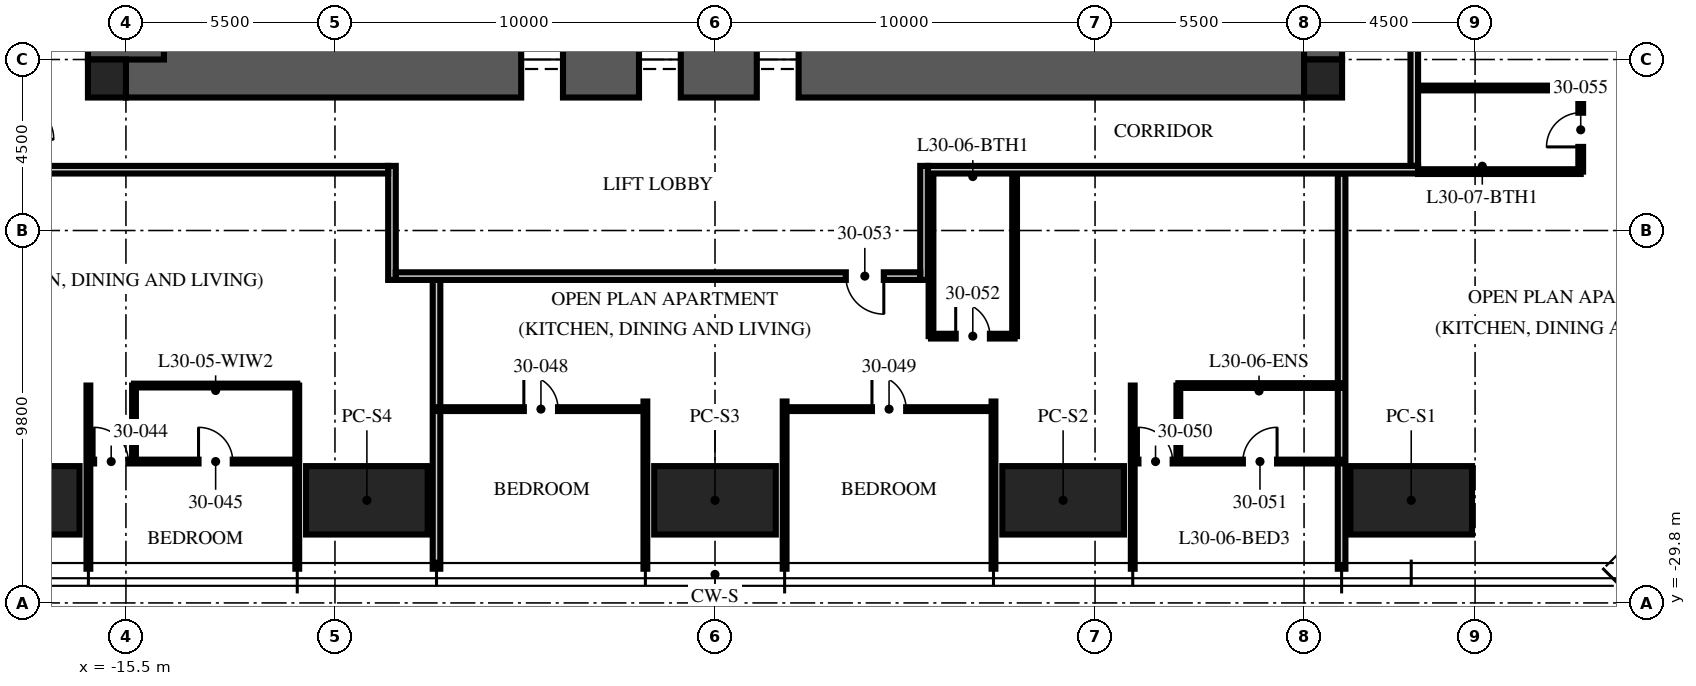
"""IFC4 building model, lengths in metres.
Left out: names, types, materials, properties, quantities, classifications, styles, units other than length and angle.
Written with IfcOpenShell. Run it as: python <this file> out.ifc"""

import sys

from ifc_helpers import new_model, si_unit, direction, frame, frame_2d, origin, origin_2d, place, context, subcontext, project, spatial, rectangle, extrude, element, fill, save


model = new_model("IFC4")
c1 = context("Model", 3, precision=1e-05, world=origin(), true_north=direction((0.0, 1.0)))
c2 = subcontext(c1, "Body", "Model", "MODEL_VIEW")
j1 = project(units=[si_unit("LENGTHUNIT", "METRE"), si_unit("PLANEANGLEUNIT", "RADIAN")], contexts=[c1])
p1 = place(None, origin())
s1 = spatial("IfcSite", under=j1, at=p1, CompositionType="ELEMENT")
p2 = place(p1, origin())
s2 = spatial("IfcBuilding", under=s1, at=p2, CompositionType="ELEMENT")
p3 = place(p2, frame((0.0, 0.0, 122.25)))
s3 = spatial("IfcBuildingStorey", under=s2, at=p3, CompositionType="ELEMENT", Elevation=122.25)
p4 = place(p3, frame((15.5, -15.5, -0.25), z_axis=(0.0, 0.0, 1.0), x_axis=(0.0, 1.0, 0.0)))
e1 = element("IfcWall", 1, at=p4, inside=s3, PredefinedType="SHEAR", context=c2, shape_type="SweptSolid", body=[
    extrude(rectangle(XDim=31.0, YDim=2.0, at=frame_2d((15.5, 0.0))), origin(), (0.0, 0.0, 1.0), 3.75),
])
p5 = place(p4, frame((6.5, 0.0, 0.25)))
e2 = element("IfcOpeningElement", 2, at=p5, cuts=e1, PredefinedType="OPENING", context=c2, shape_type="SweptSolid", body=[
    extrude(rectangle(XDim=1.2, YDim=2.1, at=frame_2d((0.6, 1.05))), frame((0.0, 1.01, 0.0), z_axis=(0.0, -1.0, 0.0), x_axis=(1.0, 0.0, 0.0)), (0.0, 0.0, 1.0), 2.02),
])
p6 = place(p4, frame((23.0, 0.0, 0.25)))
e3 = element("IfcOpeningElement", 3, at=p6, cuts=e1, PredefinedType="OPENING", context=c2, shape_type="SweptSolid", body=[
    extrude(rectangle(XDim=1.8, YDim=2.1, at=frame_2d((0.9, 1.05))), frame((0.0, 1.01, 0.0), z_axis=(0.0, -1.0, 0.0), x_axis=(1.0, 0.0, 0.0)), (0.0, 0.0, 1.0), 2.02),
])
p7 = place(p3, frame((-15.5, -15.5, -0.25), z_axis=(0.0, 0.0, 1.0), x_axis=(1.0, 0.0, 0.0)))
e4 = element("IfcWall", 4, at=p7, inside=s3, PredefinedType="SHEAR", context=c2, shape_type="SweptSolid", body=[
    extrude(rectangle(XDim=31.0, YDim=2.0, at=frame_2d((15.5, 0.0))), origin(), (0.0, 0.0, 1.0), 3.75),
])
p8 = place(p7, frame((10.4, 0.0, 0.25)))
e5 = element("IfcOpeningElement", 5, at=p8, cuts=e4, PredefinedType="OPENING", context=c2, shape_type="SweptSolid", body=[
    extrude(rectangle(XDim=1.1, YDim=2.1, at=frame_2d((0.55, 1.05))), frame((0.0, 1.01, 0.0), z_axis=(0.0, -1.0, 0.0), x_axis=(1.0, 0.0, 0.0)), (0.0, 0.0, 1.0), 2.02),
])
p9 = place(p7, frame((13.5, 0.0, 0.25)))
e6 = element("IfcOpeningElement", 6, at=p9, cuts=e4, PredefinedType="OPENING", context=c2, shape_type="SweptSolid", body=[
    extrude(rectangle(XDim=1.1, YDim=2.1, at=frame_2d((0.55, 1.05))), frame((0.0, 1.01, 0.0), z_axis=(0.0, -1.0, 0.0), x_axis=(1.0, 0.0, 0.0)), (0.0, 0.0, 1.0), 2.02),
])
p10 = place(p7, frame((16.6, 0.0, 0.25)))
e7 = element("IfcOpeningElement", 7, at=p10, cuts=e4, PredefinedType="OPENING", context=c2, shape_type="SweptSolid", body=[
    extrude(rectangle(XDim=1.1, YDim=2.1, at=frame_2d((0.55, 1.05))), frame((0.0, 1.01, 0.0), z_axis=(0.0, -1.0, 0.0), x_axis=(1.0, 0.0, 0.0)), (0.0, 0.0, 1.0), 2.02),
])
p11 = place(p3, frame((-15.5, -15.5, -0.25), z_axis=(0.0, 0.0, 1.0), x_axis=(0.0, 1.0, 0.0)))
e8 = element("IfcWall", 8, at=p11, inside=s3, PredefinedType="SHEAR", context=c2, shape_type="SweptSolid", body=[
    extrude(rectangle(XDim=31.0, YDim=2.0, at=frame_2d((15.5, 0.0))), origin(), (0.0, 0.0, 1.0), 3.75),
])
p12 = place(p11, frame((6.5, 0.0, 0.25)))
e9 = element("IfcOpeningElement", 9, at=p12, cuts=e8, PredefinedType="OPENING", context=c2, shape_type="SweptSolid", body=[
    extrude(rectangle(XDim=1.2, YDim=2.1, at=frame_2d((0.6, 1.05))), frame((0.0, 1.01, 0.0), z_axis=(0.0, -1.0, 0.0), x_axis=(1.0, 0.0, 0.0)), (0.0, 0.0, 1.0), 2.02),
])
p13 = place(p11, frame((23.0, 0.0, 0.25)))
e10 = element("IfcOpeningElement", 10, at=p13, cuts=e8, PredefinedType="OPENING", context=c2, shape_type="SweptSolid", body=[
    extrude(rectangle(XDim=1.8, YDim=2.1, at=frame_2d((0.9, 1.05))), frame((0.0, 1.01, 0.0), z_axis=(0.0, -1.0, 0.0), x_axis=(1.0, 0.0, 0.0)), (0.0, 0.0, 1.0), 2.02),
])
for number, where, z_axis, x_axis in (
    (11, (-16.0, -16.0, -0.25), (0.0, 0.0, 1.0), (1.0, 0.0, 0.0)),
    (12, (16.0, -16.0, -0.25), (0.0, 0.0, 1.0), (1.0, 0.0, 0.0)),
):
    element("IfcColumn", number, at=place(p3, frame(where, z_axis=z_axis, x_axis=x_axis)), inside=s3, PredefinedType="COLUMN", context=c2, shape_type="SweptSolid", body=[
        extrude(rectangle(XDim=1.0, YDim=1.0, at=origin_2d()), origin(), (0.0, 0.0, 1.0), 3.75),
    ])
for number, where, z_axis, x_axis in (
    (13, (18.32, -27.1, 0.0), (0.0, 0.0, 1.0), (1.0, 0.0, 0.0)),
    (14, (9.16, -27.1, 0.0), (0.0, 0.0, 1.0), (1.0, 0.0, 0.0)),
    (15, (0.0, -27.1, 0.0), (0.0, 0.0, 1.0), (1.0, 0.0, 0.0)),
    (16, (-9.16, -27.1, 0.0), (0.0, 0.0, 1.0), (1.0, 0.0, 0.0)),
    (17, (-18.32, -27.1, 0.0), (0.0, 0.0, 1.0), (1.0, 0.0, 0.0)),
):
    element("IfcColumn", number, at=place(p3, frame(where, z_axis=z_axis, x_axis=x_axis)), inside=s3, PredefinedType="COLUMN", context=c2, shape_type="SweptSolid", body=[
        extrude(rectangle(XDim=3.2, YDim=1.8, at=origin_2d()), origin(), (0.0, 0.0, 1.0), 3.75),
    ])
for number, where, z_axis, x_axis in (
    (18, (-16.488, -24.08, 0.0), (0.0, 0.0, 1.0), (0.0, -1.0, 0.0)),
    (19, (-10.992, -24.08, 0.0), (0.0, 0.0, 1.0), (0.0, -1.0, 0.0)),
):
    element("IfcWall", number, at=place(p3, frame(where, z_axis=z_axis, x_axis=x_axis)), inside=s3, PredefinedType="PARTITIONING", context=c2, shape_type="SweptSolid", body=[
        extrude(rectangle(XDim=4.82, YDim=0.1, at=frame_2d((2.41, 0.0))), origin(), (0.0, 0.0, 1.0), 2.81),
    ])
p14 = place(p3, frame((-7.328, -21.3, 0.0), z_axis=(0.0, 0.0, 1.0), x_axis=(0.0, -1.0, 0.0)))
e20 = element("IfcWall", 20, at=p14, inside=s3, PredefinedType="PARTITIONING", context=c2, shape_type="SweptSolid", body=[
    extrude(rectangle(XDim=7.6, YDim=0.2, at=frame_2d((3.8, 0.0))), origin(), (0.0, 0.0, 1.0), 2.81),
])
for number, where, z_axis, x_axis in (
    (21, (-1.832, -24.5, 0.0), (0.0, 0.0, 1.0), (0.0, -1.0, 0.0)),
    (22, (1.832, -24.5, 0.0), (0.0, 0.0, 1.0), (0.0, -1.0, 0.0)),
    (23, (7.328, -24.5, 0.0), (0.0, 0.0, 1.0), (0.0, -1.0, 0.0)),
):
    element("IfcWall", number, at=place(p3, frame(where, z_axis=z_axis, x_axis=x_axis)), inside=s3, PredefinedType="PARTITIONING", context=c2, shape_type="SweptSolid", body=[
        extrude(rectangle(XDim=4.4, YDim=0.1, at=frame_2d((2.2, 0.0))), origin(), (0.0, 0.0, 1.0), 2.81),
    ])
p15 = place(p3, frame((10.992, -24.08, 0.0), z_axis=(0.0, 0.0, 1.0), x_axis=(0.0, -1.0, 0.0)))
e24 = element("IfcWall", 24, at=p15, inside=s3, PredefinedType="PARTITIONING", context=c2, shape_type="SweptSolid", body=[
    extrude(rectangle(XDim=4.82, YDim=0.1, at=frame_2d((2.41, 0.0))), origin(), (0.0, 0.0, 1.0), 2.81),
])
p16 = place(p3, frame((16.488, -18.5, 0.0), z_axis=(0.0, 0.0, 1.0), x_axis=(0.0, -1.0, 0.0)))
e25 = element("IfcWall", 25, at=p16, inside=s3, PredefinedType="PARTITIONING", context=c2, shape_type="SweptSolid", body=[
    extrude(rectangle(XDim=10.4, YDim=0.2, at=frame_2d((5.2, 0.0))), origin(), (0.0, 0.0, 1.0), 2.81),
])
p17 = place(p3, frame((-16.488, -26.08, 0.0), z_axis=(0.0, 0.0, 1.0), x_axis=(1.0, 0.0, 0.0)))
e26 = element("IfcWall", 26, at=p17, inside=s3, PredefinedType="PARTITIONING", context=c2, shape_type="SweptSolid", body=[
    extrude(rectangle(XDim=5.496, YDim=0.1, at=frame_2d((2.748, 0.0))), origin(), (0.0, 0.0, 1.0), 2.81),
])
p18 = place(p17, frame((0.15, 0.0, 0.0)))
e27 = element("IfcOpeningElement", 27, at=p18, cuts=e26, PredefinedType="OPENING", context=c2, shape_type="SweptSolid", body=[
    extrude(rectangle(XDim=0.9, YDim=2.1, at=frame_2d((0.45, 1.05))), frame((0.0, 0.06, 0.0), z_axis=(0.0, -1.0, 0.0), x_axis=(1.0, 0.0, 0.0)), (0.0, 0.0, 1.0), 0.12),
])
p19 = place(p17, frame((2.898, 0.0, 0.0)))
e28 = element("IfcOpeningElement", 28, at=p19, cuts=e26, PredefinedType="OPENING", context=c2, shape_type="SweptSolid", body=[
    extrude(rectangle(XDim=0.9, YDim=2.1, at=frame_2d((0.45, 1.05))), frame((0.0, 0.06, 0.0), z_axis=(0.0, -1.0, 0.0), x_axis=(1.0, 0.0, 0.0)), (0.0, 0.0, 1.0), 0.12),
])
p20 = place(p3, frame((-15.288, -24.08, 0.0), z_axis=(0.0, 0.0, 1.0), x_axis=(0.0, -1.0, 0.0)))
e29 = element("IfcWall", 29, at=p20, inside=s3, PredefinedType="PARTITIONING", context=c2, shape_type="SweptSolid", body=[
    extrude(rectangle(XDim=2.0, YDim=0.1, at=frame_2d((1.0, 0.0))), origin(), (0.0, 0.0, 1.0), 3.5),
])
p21 = place(p3, frame((-15.288, -24.08, 0.0), z_axis=(0.0, 0.0, 1.0), x_axis=(1.0, 0.0, 0.0)))
e30 = element("IfcWall", 30, at=p21, inside=s3, PredefinedType="PARTITIONING", context=c2, shape_type="SweptSolid", body=[
    extrude(rectangle(XDim=4.296, YDim=0.1, at=frame_2d((2.148, 0.0))), origin(), (0.0, 0.0, 1.0), 2.81),
])
p22 = place(p3, frame((-7.328, -24.7, 0.0), z_axis=(0.0, 0.0, 1.0), x_axis=(1.0, 0.0, 0.0)))
e31 = element("IfcWall", 31, at=p22, inside=s3, PredefinedType="PARTITIONING", context=c2, shape_type="SweptSolid", body=[
    extrude(rectangle(XDim=5.496, YDim=0.1, at=frame_2d((2.748, 0.0))), origin(), (0.0, 0.0, 1.0), 2.81),
])
p23 = place(p22, frame((2.298, 0.0, 0.0)))
e32 = element("IfcOpeningElement", 32, at=p23, cuts=e31, PredefinedType="OPENING", context=c2, shape_type="SweptSolid", body=[
    extrude(rectangle(XDim=0.9, YDim=2.1, at=frame_2d((0.45, 1.05))), frame((0.0, 0.06, 0.0), z_axis=(0.0, -1.0, 0.0), x_axis=(1.0, 0.0, 0.0)), (0.0, 0.0, 1.0), 0.12),
])
p24 = place(p3, frame((1.832, -24.7, 0.0), z_axis=(0.0, 0.0, 1.0), x_axis=(1.0, 0.0, 0.0)))
e33 = element("IfcWall", 33, at=p24, inside=s3, PredefinedType="PARTITIONING", context=c2, shape_type="SweptSolid", body=[
    extrude(rectangle(XDim=5.496, YDim=0.1, at=frame_2d((2.748, 0.0))), origin(), (0.0, 0.0, 1.0), 2.81),
])
p25 = place(p24, frame((2.298, 0.0, 0.0)))
e34 = element("IfcOpeningElement", 34, at=p25, cuts=e33, PredefinedType="OPENING", context=c2, shape_type="SweptSolid", body=[
    extrude(rectangle(XDim=0.9, YDim=2.1, at=frame_2d((0.45, 1.05))), frame((0.0, 0.06, 0.0), z_axis=(0.0, -1.0, 0.0), x_axis=(1.0, 0.0, 0.0)), (0.0, 0.0, 1.0), 0.12),
])
p26 = place(p3, frame((10.992, -26.08, 0.0), z_axis=(0.0, 0.0, 1.0), x_axis=(1.0, 0.0, 0.0)))
e35 = element("IfcWall", 35, at=p26, inside=s3, PredefinedType="PARTITIONING", context=c2, shape_type="SweptSolid", body=[
    extrude(rectangle(XDim=5.496, YDim=0.1, at=frame_2d((2.748, 0.0))), origin(), (0.0, 0.0, 1.0), 2.81),
])
p27 = place(p26, frame((0.15, 0.0, 0.0)))
e36 = element("IfcOpeningElement", 36, at=p27, cuts=e35, PredefinedType="OPENING", context=c2, shape_type="SweptSolid", body=[
    extrude(rectangle(XDim=0.9, YDim=2.1, at=frame_2d((0.45, 1.05))), frame((0.0, 0.06, 0.0), z_axis=(0.0, -1.0, 0.0), x_axis=(1.0, 0.0, 0.0)), (0.0, 0.0, 1.0), 0.12),
])
p28 = place(p26, frame((2.898, 0.0, 0.0)))
e37 = element("IfcOpeningElement", 37, at=p28, cuts=e35, PredefinedType="OPENING", context=c2, shape_type="SweptSolid", body=[
    extrude(rectangle(XDim=0.9, YDim=2.1, at=frame_2d((0.45, 1.05))), frame((0.0, 0.06, 0.0), z_axis=(0.0, -1.0, 0.0), x_axis=(1.0, 0.0, 0.0)), (0.0, 0.0, 1.0), 0.12),
])
p29 = place(p3, frame((12.192, -24.08, 0.0), z_axis=(0.0, 0.0, 1.0), x_axis=(0.0, -1.0, 0.0)))
e38 = element("IfcWall", 38, at=p29, inside=s3, PredefinedType="PARTITIONING", context=c2, shape_type="SweptSolid", body=[
    extrude(rectangle(XDim=2.0, YDim=0.1, at=frame_2d((1.0, 0.0))), origin(), (0.0, 0.0, 1.0), 3.5),
])
p30 = place(p3, frame((12.192, -24.08, 0.0), z_axis=(0.0, 0.0, 1.0), x_axis=(1.0, 0.0, 0.0)))
e39 = element("IfcWall", 39, at=p30, inside=s3, PredefinedType="PARTITIONING", context=c2, shape_type="SweptSolid", body=[
    extrude(rectangle(XDim=4.296, YDim=0.125, at=frame_2d((2.148, 0.0))), origin(), (0.0, 0.0, 1.0), 2.81),
])
p31 = place(p3, frame((5.684, -22.78, 0.0), z_axis=(0.0, 0.0, 1.0), x_axis=(1.0, 0.0, 0.0)))
e40 = element("IfcWall", 40, at=p31, inside=s3, PredefinedType="PARTITIONING", context=c2, shape_type="SweptSolid", body=[
    extrude(rectangle(XDim=2.2, YDim=0.125, at=frame_2d((1.1, 0.0))), origin(), (0.0, 0.0, 1.0), 3.5),
])
p32 = place(p31, frame((0.65, 0.0, 0.0)))
e41 = element("IfcOpeningElement", 41, at=p32, cuts=e40, PredefinedType="OPENING", context=c2, shape_type="SweptSolid", body=[
    extrude(rectangle(XDim=0.9, YDim=2.1, at=frame_2d((0.45, 1.05))), frame((0.0, 0.073, 0.0), z_axis=(0.0, -1.0, 0.0), x_axis=(1.0, 0.0, 0.0)), (0.0, 0.0, 1.0), 0.145),
])
for number, where, z_axis, x_axis in (
    (42, (5.684, -18.5, 0.0), (0.0, 0.0, 1.0), (0.0, -1.0, 0.0)),
    (43, (7.884, -18.5, 0.0), (0.0, 0.0, 1.0), (0.0, -1.0, 0.0)),
):
    element("IfcWall", number, at=place(p3, frame(where, z_axis=z_axis, x_axis=x_axis)), inside=s3, PredefinedType="PARTITIONING", context=c2, shape_type="SweptSolid", body=[
        extrude(rectangle(XDim=4.28, YDim=0.125, at=frame_2d((2.14, 0.0))), origin(), (0.0, 0.0, 1.0), 3.5),
    ])
p33 = place(p3, frame((22.78, -18.45, 0.0), z_axis=(0.0, 0.0, 1.0), x_axis=(0.0, 1.0, 0.0)))
e44 = element("IfcWall", 44, at=p33, inside=s3, PredefinedType="PARTITIONING", context=c2, shape_type="SweptSolid", body=[
    extrude(rectangle(XDim=2.2, YDim=0.125, at=frame_2d((1.1, 0.0))), origin(), (0.0, 0.0, 1.0), 2.7),
])
p34 = place(p33, frame((0.65, 0.0, 0.0)))
e45 = element("IfcOpeningElement", 45, at=p34, cuts=e44, PredefinedType="OPENING", context=c2, shape_type="SweptSolid", body=[
    extrude(rectangle(XDim=0.9, YDim=2.1, at=frame_2d((0.45, 1.05))), frame((0.0, 0.073, 0.0), z_axis=(0.0, -1.0, 0.0), x_axis=(1.0, 0.0, 0.0)), (0.0, 0.0, 1.0), 0.145),
])
p35 = place(p3, frame((18.5, -18.45, 0.0), z_axis=(0.0, 0.0, 1.0), x_axis=(1.0, 0.0, 0.0)))
e46 = element("IfcWall", 46, at=p35, inside=s3, PredefinedType="PARTITIONING", context=c2, shape_type="SweptSolid", body=[
    extrude(rectangle(XDim=4.28, YDim=0.125, at=frame_2d((2.14, 0.0))), origin(), (0.0, 0.0, 1.0), 2.3),
])
p36 = place(p3, frame((18.5, -16.25, 0.0), z_axis=(0.0, 0.0, 1.0), x_axis=(1.0, 0.0, 0.0)))
e47 = element("IfcWall", 47, at=p36, inside=s3, PredefinedType="PARTITIONING", context=c2, shape_type="SweptSolid", body=[
    extrude(rectangle(XDim=4.28, YDim=0.125, at=frame_2d((2.14, 0.0))), origin(), (0.0, 0.0, 1.0), 3.5),
])
p37 = place(p3, frame((18.4, -18.3, 0.0), z_axis=(0.0, 0.0, 1.0), x_axis=(0.0, 1.0, 0.0)))
e48 = element("IfcWall", 48, at=p37, inside=s3, PredefinedType="PARTITIONING", context=c2, shape_type="SweptSolid", body=[
    extrude(rectangle(XDim=8.972, YDim=0.2, at=frame_2d((4.486, 0.0))), origin(), (0.0, 0.0, 1.0), 2.3),
])
p38 = place(p3, frame((18.5, -18.4, 0.0), z_axis=(0.0, 0.0, 1.0), x_axis=(-1.0, 0.0, 0.0)))
e49 = element("IfcWall", 49, at=p38, inside=s3, PredefinedType="PARTITIONING", context=c2, shape_type="SweptSolid", body=[
    extrude(rectangle(XDim=12.9, YDim=0.2, at=frame_2d((6.45, 0.0))), origin(), (0.0, 0.0, 1.0), 2.3),
])
for number, where, z_axis, x_axis in (
    (50, (5.5, -18.3, 0.0), (0.0, 0.0, 1.0), (0.0, -1.0, 0.0)),
    (51, (-8.5, -18.3, 0.0), (0.0, 0.0, 1.0), (0.0, -1.0, 0.0)),
):
    element("IfcWall", number, at=place(p3, frame(where, z_axis=z_axis, x_axis=x_axis)), inside=s3, PredefinedType="PARTITIONING", context=c2, shape_type="SweptSolid", body=[
        extrude(rectangle(XDim=3.0, YDim=0.2, at=frame_2d((1.5, 0.0))), origin(), (0.0, 0.0, 1.0), 3.5),
    ])
p39 = place(p3, frame((5.4, -21.2, 0.0), z_axis=(0.0, 0.0, 1.0), x_axis=(-1.0, 0.0, 0.0)))
e52 = element("IfcWall", 52, at=p39, inside=s3, PredefinedType="PARTITIONING", context=c2, shape_type="SweptSolid", body=[
    extrude(rectangle(XDim=13.8, YDim=0.2, at=frame_2d((6.9, 0.0))), origin(), (0.0, 0.0, 1.0), 2.7),
])
p40 = place(p39, frame((0.958, 0.0, 0.0)))
e53 = element("IfcOpeningElement", 53, at=p40, cuts=e52, PredefinedType="OPENING", context=c2, shape_type="SweptSolid", body=[
    extrude(rectangle(XDim=1.0, YDim=2.2, at=frame_2d((0.5, 1.1))), frame((0.0, 0.11, 0.0), z_axis=(0.0, -1.0, 0.0), x_axis=(1.0, 0.0, 0.0)), (0.0, 0.0, 1.0), 0.22),
])
p41 = place(p3, frame((-8.6, -18.4, 0.0), z_axis=(0.0, 0.0, 1.0), x_axis=(-1.0, 0.0, 0.0)))
e54 = element("IfcWall", 54, at=p41, inside=s3, PredefinedType="PARTITIONING", context=c2, shape_type="SweptSolid", body=[
    extrude(rectangle(XDim=9.9, YDim=0.2, at=frame_2d((4.95, 0.0))), origin(), (0.0, 0.0, 1.0), 2.3),
])
p42 = place(p8, origin())
e55 = element("IfcDoor", 55, at=p42, inside=s3, OperationType="DOUBLE_DOOR_SLIDING", PredefinedType="DOOR", context=c2, shape_type="SweptSolid", body=[
    extrude(rectangle(XDim=1.1, YDim=2.1, at=frame_2d((0.55, 1.05))), frame((0.0, 0.025, 0.0), z_axis=(0.0, -1.0, 0.0), x_axis=(1.0, 0.0, 0.0)), (0.0, 0.0, 1.0), 0.05),
])
fill(e5, e55)
p43 = place(p9, origin())
e56 = element("IfcDoor", 56, at=p43, inside=s3, OperationType="DOUBLE_DOOR_SLIDING", PredefinedType="DOOR", context=c2, shape_type="SweptSolid", body=[
    extrude(rectangle(XDim=1.1, YDim=2.1, at=frame_2d((0.55, 1.05))), frame((0.0, 0.025, 0.0), z_axis=(0.0, -1.0, 0.0), x_axis=(1.0, 0.0, 0.0)), (0.0, 0.0, 1.0), 0.05),
])
fill(e6, e56)
p44 = place(p10, origin())
e57 = element("IfcDoor", 57, at=p44, inside=s3, OperationType="DOUBLE_DOOR_SLIDING", PredefinedType="DOOR", context=c2, shape_type="SweptSolid", body=[
    extrude(rectangle(XDim=1.1, YDim=2.1, at=frame_2d((0.55, 1.05))), frame((0.0, 0.025, 0.0), z_axis=(0.0, -1.0, 0.0), x_axis=(1.0, 0.0, 0.0)), (0.0, 0.0, 1.0), 0.05),
])
fill(e7, e57)
p45 = place(p18, origin())
e58 = element("IfcDoor", 58, at=p45, inside=s3, OperationType="SINGLE_SWING_LEFT", PredefinedType="DOOR", context=c2, shape_type="SweptSolid", body=[
    extrude(rectangle(XDim=0.9, YDim=2.1, at=frame_2d((0.45, 1.05))), frame((0.0, 0.025, 0.0), z_axis=(0.0, -1.0, 0.0), x_axis=(1.0, 0.0, 0.0)), (0.0, 0.0, 1.0), 0.05),
])
fill(e27, e58)
p46 = place(p19, origin())
e59 = element("IfcDoor", 59, at=p46, inside=s3, OperationType="SINGLE_SWING_LEFT", PredefinedType="DOOR", context=c2, shape_type="SweptSolid", body=[
    extrude(rectangle(XDim=0.9, YDim=2.1, at=frame_2d((0.45, 1.05))), frame((0.0, 0.025, 0.0), z_axis=(0.0, -1.0, 0.0), x_axis=(1.0, 0.0, 0.0)), (0.0, 0.0, 1.0), 0.05),
])
fill(e28, e59)
p47 = place(p23, origin())
e60 = element("IfcDoor", 60, at=p47, inside=s3, OperationType="SINGLE_SWING_LEFT", PredefinedType="DOOR", context=c2, shape_type="SweptSolid", body=[
    extrude(rectangle(XDim=0.9, YDim=2.1, at=frame_2d((0.45, 1.05))), frame((0.0, 0.025, 0.0), z_axis=(0.0, -1.0, 0.0), x_axis=(1.0, 0.0, 0.0)), (0.0, 0.0, 1.0), 0.05),
])
fill(e32, e60)
p48 = place(p25, origin())
e61 = element("IfcDoor", 61, at=p48, inside=s3, OperationType="SINGLE_SWING_LEFT", PredefinedType="DOOR", context=c2, shape_type="SweptSolid", body=[
    extrude(rectangle(XDim=0.9, YDim=2.1, at=frame_2d((0.45, 1.05))), frame((0.0, 0.025, 0.0), z_axis=(0.0, -1.0, 0.0), x_axis=(1.0, 0.0, 0.0)), (0.0, 0.0, 1.0), 0.05),
])
fill(e34, e61)
p49 = place(p27, origin())
e62 = element("IfcDoor", 62, at=p49, inside=s3, OperationType="SINGLE_SWING_LEFT", PredefinedType="DOOR", context=c2, shape_type="SweptSolid", body=[
    extrude(rectangle(XDim=0.9, YDim=2.1, at=frame_2d((0.45, 1.05))), frame((0.0, 0.025, 0.0), z_axis=(0.0, -1.0, 0.0), x_axis=(1.0, 0.0, 0.0)), (0.0, 0.0, 1.0), 0.05),
])
fill(e36, e62)
p50 = place(p28, origin())
e63 = element("IfcDoor", 63, at=p50, inside=s3, OperationType="SINGLE_SWING_RIGHT", PredefinedType="DOOR", context=c2, shape_type="SweptSolid", body=[
    extrude(rectangle(XDim=0.9, YDim=2.1, at=frame_2d((0.45, 1.05))), frame((0.0, 0.025, 0.0), z_axis=(0.0, -1.0, 0.0), x_axis=(1.0, 0.0, 0.0)), (0.0, 0.0, 1.0), 0.05),
])
fill(e37, e63)
p51 = place(p32, origin())
e64 = element("IfcDoor", 64, at=p51, inside=s3, OperationType="SINGLE_SWING_LEFT", PredefinedType="DOOR", context=c2, shape_type="SweptSolid", body=[
    extrude(rectangle(XDim=0.9, YDim=2.1, at=frame_2d((0.45, 1.05))), frame((0.0, 0.025, 0.0), z_axis=(0.0, -1.0, 0.0), x_axis=(1.0, 0.0, 0.0)), (0.0, 0.0, 1.0), 0.05),
])
fill(e41, e64)
p52 = place(p40, origin())
e65 = element("IfcDoor", 65, at=p52, inside=s3, OperationType="SINGLE_SWING_LEFT", PredefinedType="DOOR", context=c2, shape_type="SweptSolid", body=[
    extrude(rectangle(XDim=1.0, YDim=2.2, at=frame_2d((0.5, 1.1))), frame((0.0, 0.025, 0.0), z_axis=(0.0, -1.0, 0.0), x_axis=(1.0, 0.0, 0.0)), (0.0, 0.0, 1.0), 0.05),
])
fill(e53, e65)
p53 = place(p34, origin())
e66 = element("IfcDoor", 66, at=p53, inside=s3, OperationType="SINGLE_SWING_LEFT", PredefinedType="DOOR", context=c2, shape_type="SweptSolid", body=[
    extrude(rectangle(XDim=0.9, YDim=2.1, at=frame_2d((0.45, 1.05))), frame((0.0, 0.025, 0.0), z_axis=(0.0, -1.0, 0.0), x_axis=(1.0, 0.0, 0.0)), (0.0, 0.0, 1.0), 0.05),
])
fill(e45, e66)
save(model, sys.argv[1])
